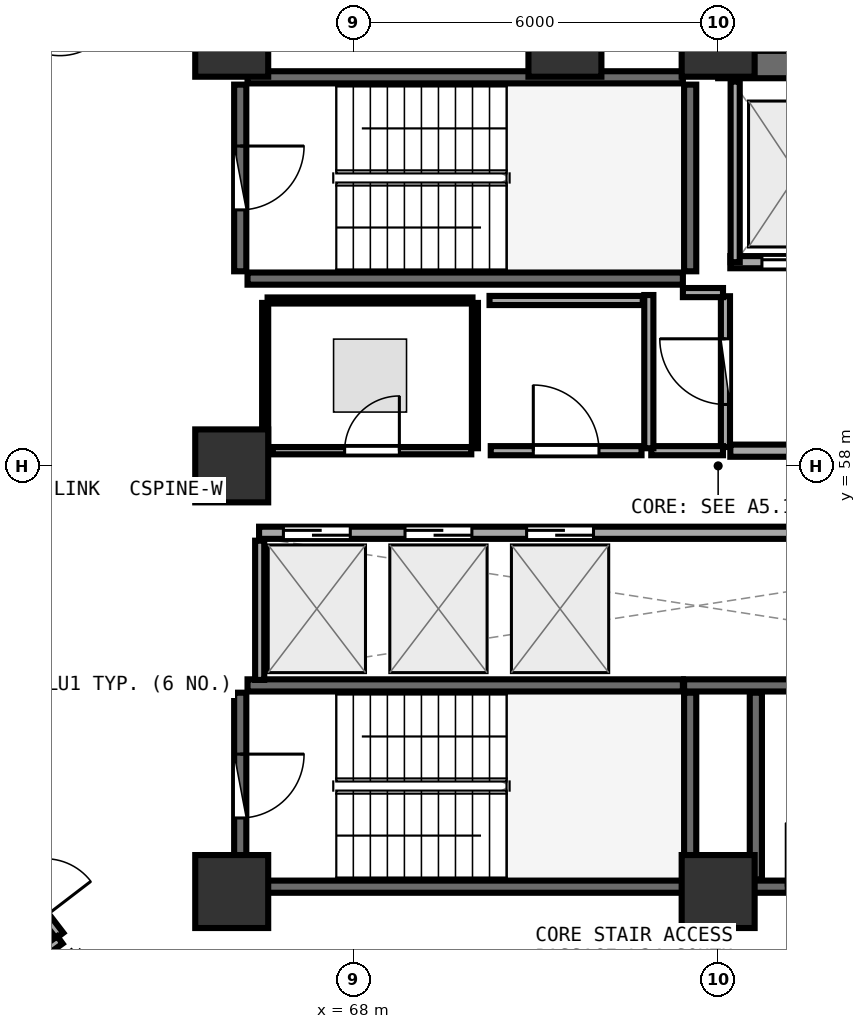
"""IFC4 building model, lengths in metres.
Left out: names, types, materials, properties, quantities, classifications, styles, units other than length and angle.
Written with IfcOpenShell. Run it as: python <this file> out.ifc"""

import sys

from ifc_helpers import new_model, si_unit, direction, frame, frame_2d, origin, origin_2d, place, context, subcontext, project, spatial, rectangle, extrude, element, fill, save


model = new_model("IFC4")
c1 = context("Model", 3, precision=1e-05, world=origin(), true_north=direction((0.0, 1.0)))
c2 = subcontext(c1, "Body", "Model", "MODEL_VIEW")
j1 = project(units=[si_unit("LENGTHUNIT", "METRE"), si_unit("PLANEANGLEUNIT", "RADIAN")], contexts=[c1])
p1 = place(None, origin())
s1 = spatial("IfcSite", under=j1, at=p1, CompositionType="ELEMENT")
p2 = place(p1, origin())
s2 = spatial("IfcBuilding", under=s1, at=p2, CompositionType="ELEMENT")
p3 = place(p2, frame((0.0, 0.0, 135.6)))
s3 = spatial("IfcBuildingStorey", under=s2, at=p3, CompositionType="ELEMENT", Elevation=135.6)
for number, where, z_axis, x_axis in (
    (1, (66.0, 51.0, 0.0), (0.0, 0.0, 1.0), (1.0, 0.0, 0.0)),
    (2, (74.0, 51.0, 0.0), (0.0, 0.0, 1.0), (1.0, 0.0, 0.0)),
    (3, (74.0, 65.0, 0.0), (0.0, 0.0, 1.0), (1.0, 0.0, 0.0)),
    (4, (71.48, 65.0, 0.0), (0.0, 0.0, 1.0), (1.0, 0.0, 0.0)),
    (5, (66.0, 65.0, 0.0), (0.0, 0.0, 1.0), (1.0, 0.0, 0.0)),
    (6, (66.0, 58.0, 0.0), (0.0, 0.0, 1.0), (1.0, 0.0, 0.0)),
):
    element("IfcColumn", number, at=place(p3, frame(where, z_axis=z_axis, x_axis=x_axis)), inside=s3, PredefinedType="PILASTER", context=c2, shape_type="SweptSolid", body=[
        extrude(rectangle(XDim=1.2, YDim=1.2, at=origin_2d()), origin(), (0.0, 0.0, 1.0), 3.75),
    ])
p4 = place(p3, frame((66.26, 61.08, 0.0), z_axis=(0.0, 0.0, 1.0), x_axis=(1.0, 0.0, 0.0)))
e7 = element("IfcWall", 7, at=p4, inside=s3, PredefinedType="SHEAR", context=c2, shape_type="SweptSolid", body=[
    extrude(rectangle(XDim=7.16, YDim=0.2, at=frame_2d((3.58, 0.0))), origin(), (0.0, 0.0, 1.0), 3.49),
])
p5 = place(p3, frame((73.54, 61.2, 0.0), z_axis=(0.0, 0.0, 1.0), x_axis=(0.0, 1.0, 0.0)))
e8 = element("IfcWall", 8, at=p5, inside=s3, PredefinedType="SHEAR", context=c2, shape_type="SweptSolid", body=[
    extrude(rectangle(XDim=3.07, YDim=0.2, at=frame_2d((1.535, 0.0))), origin(), (0.0, 0.0, 1.0), 3.49),
])
p6 = place(p3, frame((73.42, 64.39, 0.0), z_axis=(0.0, 0.0, 1.0), x_axis=(-1.0, 0.0, 0.0)))
e9 = element("IfcWall", 9, at=p6, inside=s3, PredefinedType="SHEAR", context=c2, shape_type="SweptSolid", body=[
    extrude(rectangle(XDim=7.16, YDim=0.2, at=frame_2d((3.58, 0.0))), origin(), (0.0, 0.0, 1.0), 3.49),
])
p7 = place(p3, frame((66.14, 64.27, 0.0), z_axis=(0.0, 0.0, 1.0), x_axis=(0.0, -1.0, 0.0)))
e10 = element("IfcWall", 10, at=p7, inside=s3, PredefinedType="SHEAR", context=c2, shape_type="SweptSolid", body=[
    extrude(rectangle(XDim=3.07, YDim=0.2, at=frame_2d((1.535, 0.0))), origin(), (0.0, 0.0, 1.0), 3.49),
])
p8 = place(p7, frame((1.01, 0.0, 0.0)))
e11 = element("IfcOpeningElement", 11, at=p8, cuts=e10, PredefinedType="OPENING", context=c2, shape_type="SweptSolid", body=[
    extrude(rectangle(XDim=1.05, YDim=2.1, at=frame_2d((0.525, 1.05))), frame((0.0, 0.11, 0.0), z_axis=(0.0, -1.0, 0.0), x_axis=(1.0, 0.0, 0.0)), (0.0, 0.0, 1.0), 0.22),
])
p9 = place(p3, frame((74.0, 51.08, 0.0), z_axis=(0.0, 0.0, 1.0), x_axis=(1.0, 0.0, 0.0)))
e12 = element("IfcWall", 12, at=p9, inside=s3, PredefinedType="SHEAR", context=c2, shape_type="SweptSolid", body=[
    extrude(rectangle(XDim=7.9, YDim=0.2, at=frame_2d((3.95, 0.0))), origin(), (0.0, 0.0, 1.0), 3.49),
])
p10 = place(p9, frame((1.12, 0.0, 0.0)))
e13 = element("IfcOpeningElement", 13, at=p10, cuts=e12, PredefinedType="OPENING", context=c2, shape_type="SweptSolid", body=[
    extrude(rectangle(XDim=1.05, YDim=2.1, at=frame_2d((0.525, 1.05))), frame((0.0, 0.11, 0.0), z_axis=(0.0, -1.0, 0.0), x_axis=(1.0, 0.0, 0.0)), (0.0, 0.0, 1.0), 0.22),
])
p11 = place(p3, frame((81.9, 54.39, 0.0), z_axis=(0.0, 0.0, 1.0), x_axis=(-1.0, 0.0, 0.0)))
e14 = element("IfcWall", 14, at=p11, inside=s3, PredefinedType="SHEAR", context=c2, shape_type="SweptSolid", body=[
    extrude(rectangle(XDim=8.46, YDim=0.2, at=frame_2d((4.23, 0.0))), origin(), (0.0, 0.0, 1.0), 3.49),
])
p12 = place(p3, frame((74.62, 54.27, 0.0), z_axis=(0.0, 0.0, 1.0), x_axis=(0.0, -1.0, 0.0)))
e15 = element("IfcWall", 15, at=p12, inside=s3, PredefinedType="SHEAR", context=c2, shape_type="SweptSolid", body=[
    extrude(rectangle(XDim=3.07, YDim=0.2, at=frame_2d((1.535, 0.0))), origin(), (0.0, 0.0, 1.0), 3.49),
])
p13 = place(p3, frame((66.26, 51.08, 0.0), z_axis=(0.0, 0.0, 1.0), x_axis=(1.0, 0.0, 0.0)))
e16 = element("IfcWall", 16, at=p13, inside=s3, PredefinedType="SHEAR", context=c2, shape_type="SweptSolid", body=[
    extrude(rectangle(XDim=7.16, YDim=0.2, at=frame_2d((3.58, 0.0))), origin(), (0.0, 0.0, 1.0), 3.49),
])
p14 = place(p3, frame((73.54, 51.2, 0.0), z_axis=(0.0, 0.0, 1.0), x_axis=(0.0, 1.0, 0.0)))
e17 = element("IfcWall", 17, at=p14, inside=s3, PredefinedType="SHEAR", context=c2, shape_type="SweptSolid", body=[
    extrude(rectangle(XDim=3.07, YDim=0.2, at=frame_2d((1.535, 0.0))), origin(), (0.0, 0.0, 1.0), 3.49),
])
p15 = place(p3, frame((73.42, 54.39, 0.0), z_axis=(0.0, 0.0, 1.0), x_axis=(-1.0, 0.0, 0.0)))
e18 = element("IfcWall", 18, at=p15, inside=s3, PredefinedType="SHEAR", context=c2, shape_type="SweptSolid", body=[
    extrude(rectangle(XDim=7.16, YDim=0.2, at=frame_2d((3.58, 0.0))), origin(), (0.0, 0.0, 1.0), 3.49),
])
p16 = place(p3, frame((66.14, 54.27, 0.0), z_axis=(0.0, 0.0, 1.0), x_axis=(0.0, -1.0, 0.0)))
e19 = element("IfcWall", 19, at=p16, inside=s3, PredefinedType="SHEAR", context=c2, shape_type="SweptSolid", body=[
    extrude(rectangle(XDim=3.07, YDim=0.2, at=frame_2d((1.535, 0.0))), origin(), (0.0, 0.0, 1.0), 3.49),
])
p17 = place(p16, frame((1.01, 0.0, 0.0)))
e20 = element("IfcOpeningElement", 20, at=p17, cuts=e19, PredefinedType="OPENING", context=c2, shape_type="SweptSolid", body=[
    extrude(rectangle(XDim=1.05, YDim=2.1, at=frame_2d((0.525, 1.05))), frame((0.0, 0.11, 0.0), z_axis=(0.0, -1.0, 0.0), x_axis=(1.0, 0.0, 0.0)), (0.0, 0.0, 1.0), 0.22),
])
p18 = place(p3, frame((74.0, 64.6, 0.0), z_axis=(0.0, 0.0, 1.0), x_axis=(1.0, 0.0, 0.0)))
e21 = element("IfcWall", 21, at=p18, inside=s3, PredefinedType="SHEAR", context=c2, shape_type="SweptSolid", body=[
    extrude(rectangle(XDim=8.0, YDim=0.45, at=frame_2d((4.0, 0.0))), origin(), (0.0, 0.0, 1.0), 3.49),
])
p19 = place(p3, frame((74.2, 61.35, 0.0), z_axis=(0.0, 0.0, 1.0), x_axis=(1.0, 0.0, 0.0)))
e22 = element("IfcWall", 22, at=p19, inside=s3, PredefinedType="SOLIDWALL", context=c2, shape_type="SweptSolid", body=[
    extrude(rectangle(XDim=4.6, YDim=0.2, at=frame_2d((2.3, 0.0))), origin(), (0.0, 0.0, 1.0), 3.48),
])
p20 = place(p19, frame((0.52, 0.0, 0.0)))
e23 = element("IfcOpeningElement", 23, at=p20, cuts=e22, PredefinedType="OPENING", context=c2, shape_type="SweptSolid", body=[
    extrude(rectangle(XDim=1.2, YDim=2.15, at=frame_2d((0.6, 1.075))), frame((0.0, 0.11, 0.0), z_axis=(0.0, -1.0, 0.0), x_axis=(1.0, 0.0, 0.0)), (0.0, 0.0, 1.0), 0.22),
])
p21 = place(p3, frame((74.28, 61.35, 0.0), z_axis=(0.0, 0.0, 1.0), x_axis=(0.0, 1.0, 0.0)))
e24 = element("IfcWall", 24, at=p21, inside=s3, PredefinedType="PARTITIONING", context=c2, shape_type="SweptSolid", body=[
    extrude(rectangle(XDim=2.97, YDim=0.15, at=frame_2d((1.485, 0.0))), origin(), (0.0, 0.0, 1.0), 3.48),
])
p22 = place(p3, frame((74.2, 58.25, 0.0), z_axis=(0.0, 0.0, 1.0), x_axis=(1.0, 0.0, 0.0)))
e25 = element("IfcWall", 25, at=p22, inside=s3, PredefinedType="SOLIDWALL", context=c2, shape_type="SweptSolid", body=[
    extrude(rectangle(XDim=4.6, YDim=0.2, at=frame_2d((2.3, 0.0))), origin(), (0.0, 0.0, 1.0), 3.48),
])
p23 = place(p22, frame((1.8, 0.0, 0.0)))
e26 = element("IfcOpeningElement", 26, at=p23, cuts=e25, PredefinedType="OPENING", context=c2, shape_type="SweptSolid", body=[
    extrude(rectangle(XDim=1.1, YDim=2.1, at=frame_2d((0.55, 1.05))), frame((0.0, 0.11, 0.0), z_axis=(0.0, -1.0, 0.0), x_axis=(1.0, 0.0, 0.0)), (0.0, 0.0, 1.0), 0.22),
])
p24 = place(p3, frame((66.45, 56.9, 0.0), z_axis=(0.0, 0.0, 1.0), x_axis=(1.0, 0.0, 0.0)))
e27 = element("IfcWall", 27, at=p24, inside=s3, PredefinedType="SOLIDWALL", context=c2, shape_type="SweptSolid", body=[
    extrude(rectangle(XDim=14.4, YDim=0.2, at=frame_2d((7.2, 0.0))), origin(), (0.0, 0.0, 1.0), 3.48),
])
p25 = place(p24, frame((0.4, 0.0, 0.0)))
e28 = element("IfcOpeningElement", 28, at=p25, cuts=e27, PredefinedType="OPENING", context=c2, shape_type="SweptSolid", body=[
    extrude(rectangle(XDim=1.1, YDim=2.1, at=frame_2d((0.55, 1.05))), frame((0.0, 0.11, 0.0), z_axis=(0.0, -1.0, 0.0), x_axis=(1.0, 0.0, 0.0)), (0.0, 0.0, 1.0), 0.22),
])
p26 = place(p24, frame((2.4, 0.0, 0.0)))
e29 = element("IfcOpeningElement", 29, at=p26, cuts=e27, PredefinedType="OPENING", context=c2, shape_type="SweptSolid", body=[
    extrude(rectangle(XDim=1.1, YDim=2.1, at=frame_2d((0.55, 1.05))), frame((0.0, 0.11, 0.0), z_axis=(0.0, -1.0, 0.0), x_axis=(1.0, 0.0, 0.0)), (0.0, 0.0, 1.0), 0.22),
])
p27 = place(p24, frame((4.4, 0.0, 0.0)))
e30 = element("IfcOpeningElement", 30, at=p27, cuts=e27, PredefinedType="OPENING", context=c2, shape_type="SweptSolid", body=[
    extrude(rectangle(XDim=1.1, YDim=2.1, at=frame_2d((0.55, 1.05))), frame((0.0, 0.11, 0.0), z_axis=(0.0, -1.0, 0.0), x_axis=(1.0, 0.0, 0.0)), (0.0, 0.0, 1.0), 0.22),
])
p28 = place(p3, frame((66.46, 54.48, 0.0), z_axis=(0.0, 0.0, 1.0), x_axis=(0.0, 1.0, 0.0)))
e31 = element("IfcWall", 31, at=p28, inside=s3, PredefinedType="PARTITIONING", context=c2, shape_type="SweptSolid", body=[
    extrude(rectangle(XDim=2.29, YDim=0.15, at=frame_2d((1.145, 0.0))), origin(), (0.0, 0.0, 1.0), 3.48),
])
p29 = place(p3, frame((74.12, 58.31, 0.0), z_axis=(0.0, 0.0, 1.0), x_axis=(0.0, 1.0, 0.0)))
e32 = element("IfcWall", 32, at=p29, inside=s3, PredefinedType="PARTITIONING", context=c2, shape_type="SweptSolid", body=[
    extrude(rectangle(XDim=2.48, YDim=0.15, at=frame_2d((1.24, 0.0))), origin(), (0.0, 0.0, 1.0), 3.48),
])
p30 = place(p29, frame((0.7, 0.0, 0.0)))
e33 = element("IfcOpeningElement", 33, at=p30, cuts=e32, PredefinedType="OPENING", context=c2, shape_type="SweptSolid", body=[
    extrude(rectangle(XDim=1.08, YDim=2.1, at=frame_2d((0.54, 1.05))), frame((0.0, 0.085, 0.0), z_axis=(0.0, -1.0, 0.0), x_axis=(1.0, 0.0, 0.0)), (0.0, 0.0, 1.0), 0.17),
])
p31 = place(p3, frame((66.675, 58.25, 0.0), z_axis=(0.0, 0.0, 1.0), x_axis=(1.0, 0.0, 0.0)))
e34 = element("IfcWall", 34, at=p31, inside=s3, PredefinedType="PARTITIONING", context=c2, shape_type="SweptSolid", body=[
    extrude(rectangle(XDim=3.265, YDim=0.12, at=frame_2d((1.632, 0.0))), origin(), (0.0, 0.0, 1.0), 3.48),
])
p32 = place(p31, frame((1.182, 0.0, 0.0)))
e35 = element("IfcOpeningElement", 35, at=p32, cuts=e34, PredefinedType="OPENING", context=c2, shape_type="SweptSolid", body=[
    extrude(rectangle(XDim=0.9, YDim=2.08, at=frame_2d((0.45, 1.04))), frame((0.0, 0.07, 0.0), z_axis=(0.0, -1.0, 0.0), x_axis=(1.0, 0.0, 0.0)), (0.0, 0.0, 1.0), 0.14),
])
p33 = place(p3, frame((70.26, 58.25, 0.0), z_axis=(0.0, 0.0, 1.0), x_axis=(1.0, 0.0, 0.0)))
e36 = element("IfcWall", 36, at=p33, inside=s3, PredefinedType="PARTITIONING", context=c2, shape_type="SweptSolid", body=[
    extrude(rectangle(XDim=2.48, YDim=0.15, at=frame_2d((1.24, 0.0))), origin(), (0.0, 0.0, 1.0), 3.48),
])
p34 = place(p33, frame((0.7, 0.0, 0.0)))
e37 = element("IfcOpeningElement", 37, at=p34, cuts=e36, PredefinedType="OPENING", context=c2, shape_type="SweptSolid", body=[
    extrude(rectangle(XDim=1.08, YDim=2.1, at=frame_2d((0.54, 1.05))), frame((0.0, 0.085, 0.0), z_axis=(0.0, -1.0, 0.0), x_axis=(1.0, 0.0, 0.0)), (0.0, 0.0, 1.0), 0.17),
])
p35 = place(p3, frame((63.426, 66.006, 0.0), z_axis=(0.0, 0.0, 1.0), x_axis=(-0.63192798372, -0.775027111391, 0.0)))
e38 = element("IfcWall", 38, at=p35, inside=s3, PredefinedType="PARTITIONING", context=c2, shape_type="SweptSolid", body=[
    extrude(rectangle(XDim=1.747, YDim=0.15, at=frame_2d((0.874, 0.0))), origin(), (0.0, 0.0, 1.0), 2.975),
])
p36 = place(p35, frame((0.399, 0.0, 0.0)))
e39 = element("IfcOpeningElement", 39, at=p36, cuts=e38, PredefinedType="OPENING", context=c2, shape_type="SweptSolid", body=[
    extrude(rectangle(XDim=0.95, YDim=2.08, at=frame_2d((0.475, 1.04))), frame((0.0, 0.085, 0.0), z_axis=(0.0, -1.0, 0.0), x_axis=(1.0, 0.0, 0.0)), (0.0, 0.0, 1.0), 0.17),
])
p37 = place(p3, frame((62.111, 51.658, 0.0), z_axis=(0.0, 0.0, 1.0), x_axis=(0.608307977949, -0.793701079729, 0.0)))
e40 = element("IfcWall", 40, at=p37, inside=s3, PredefinedType="PARTITIONING", context=c2, shape_type="SweptSolid", body=[
    extrude(rectangle(XDim=1.742, YDim=0.15, at=frame_2d((0.871, 0.0))), origin(), (0.0, 0.0, 1.0), 2.975),
])
p38 = place(p37, frame((0.396, 0.0, 0.0)))
e41 = element("IfcOpeningElement", 41, at=p38, cuts=e40, PredefinedType="OPENING", context=c2, shape_type="SweptSolid", body=[
    extrude(rectangle(XDim=0.95, YDim=2.08, at=frame_2d((0.475, 1.04))), frame((0.0, 0.085, 0.0), z_axis=(0.0, -1.0, 0.0), x_axis=(1.0, 0.0, 0.0)), (0.0, 0.0, 1.0), 0.17),
])
p39 = place(p3, frame((72.9, 58.25, 0.0), z_axis=(0.0, 0.0, 1.0), x_axis=(1.0, 0.0, 0.0)))
e42 = element("IfcWall", 42, at=p39, inside=s3, PredefinedType="PARTITIONING", context=c2, shape_type="SweptSolid", body=[
    extrude(rectangle(XDim=1.18, YDim=0.15, at=frame_2d((0.59, 0.0))), origin(), (0.0, 0.0, 1.0), 3.48),
])
p40 = place(p3, frame((74.08, 60.85, 0.0), z_axis=(0.0, 0.0, 1.0), x_axis=(-1.0, 0.0, 0.0)))
e43 = element("IfcWall", 43, at=p40, inside=s3, PredefinedType="PARTITIONING", context=c2, shape_type="SweptSolid", body=[
    extrude(rectangle(XDim=0.66, YDim=0.15, at=frame_2d((0.33, 0.0))), origin(), (0.0, 0.0, 1.0), 3.48),
])
p41 = place(p3, frame((72.86, 60.81, 0.0), z_axis=(0.0, 0.0, 1.0), x_axis=(0.0, -1.0, 0.0)))
e44 = element("IfcWall", 44, at=p41, inside=s3, PredefinedType="PARTITIONING", context=c2, shape_type="SweptSolid", body=[
    extrude(rectangle(XDim=2.52, YDim=0.15, at=frame_2d((1.26, 0.0))), origin(), (0.0, 0.0, 1.0), 3.48),
])
p42 = place(p3, frame((70.0, 58.29, 0.0), z_axis=(0.0, 0.0, 1.0), x_axis=(0.0, 1.0, 0.0)))
e45 = element("IfcWall", 45, at=p42, inside=s3, PredefinedType="PARTITIONING", context=c2, shape_type="SweptSolid", body=[
    extrude(rectangle(XDim=2.39, YDim=0.1, at=frame_2d((1.195, 0.0))), origin(), (0.0, 0.0, 1.0), 3.48),
])
p43 = place(p3, frame((69.96, 60.72, 0.0), z_axis=(0.0, 0.0, 1.0), x_axis=(-1.0, 0.0, 0.0)))
e46 = element("IfcWall", 46, at=p43, inside=s3, PredefinedType="PARTITIONING", context=c2, shape_type="SweptSolid", body=[
    extrude(rectangle(XDim=3.37, YDim=0.1, at=frame_2d((1.685, 0.0))), origin(), (0.0, 0.0, 1.0), 3.48),
])
p44 = place(p3, frame((66.55, 60.68, 0.0), z_axis=(0.0, 0.0, 1.0), x_axis=(0.0, -1.0, 0.0)))
e47 = element("IfcWall", 47, at=p44, inside=s3, PredefinedType="PARTITIONING", context=c2, shape_type="SweptSolid", body=[
    extrude(rectangle(XDim=2.383, YDim=0.1, at=frame_2d((1.191, 0.0))), origin(), (0.0, 0.0, 1.0), 3.48),
])
p45 = place(p3, frame((72.76, 60.72, 0.0), z_axis=(0.0, 0.0, 1.0), x_axis=(-1.0, 0.0, 0.0)))
e48 = element("IfcWall", 48, at=p45, inside=s3, PredefinedType="PARTITIONING", context=c2, shape_type="SweptSolid", body=[
    extrude(rectangle(XDim=2.52, YDim=0.15, at=frame_2d((1.26, 0.0))), origin(), (0.0, 0.0, 1.0), 3.48),
])
p46 = place(p3, frame((63.175, 50.205, 0.0), z_axis=(0.0, 0.0, 1.0), x_axis=(-0.810227225477, -0.586115895618, 0.0)))
e49 = element("IfcWall", 49, at=p46, inside=s3, PredefinedType="PARTITIONING", context=c2, shape_type="SweptSolid", body=[
    extrude(rectangle(XDim=7.011, YDim=0.15, at=frame_2d((3.506, 0.0))), origin(), (0.0, 0.0, 1.0), 3.175),
])
p47 = place(p8, origin())
e50 = element("IfcDoor", 50, at=p47, inside=s3, OperationType="SINGLE_SWING_LEFT", PredefinedType="DOOR", context=c2, shape_type="SweptSolid", body=[
    extrude(rectangle(XDim=1.05, YDim=2.1, at=frame_2d((0.525, 1.05))), frame((0.0, 0.025, 0.0), z_axis=(0.0, -1.0, 0.0), x_axis=(1.0, 0.0, 0.0)), (0.0, 0.0, 1.0), 0.05),
])
fill(e11, e50)
p48 = place(p10, origin())
e51 = element("IfcDoor", 51, at=p48, inside=s3, OperationType="SINGLE_SWING_LEFT", PredefinedType="DOOR", context=c2, shape_type="SweptSolid", body=[
    extrude(rectangle(XDim=1.05, YDim=2.1, at=frame_2d((0.525, 1.05))), frame((0.0, 0.025, 0.0), z_axis=(0.0, -1.0, 0.0), x_axis=(1.0, 0.0, 0.0)), (0.0, 0.0, 1.0), 0.05),
])
fill(e13, e51)
p49 = place(p17, origin())
e52 = element("IfcDoor", 52, at=p49, inside=s3, OperationType="SINGLE_SWING_LEFT", PredefinedType="DOOR", context=c2, shape_type="SweptSolid", body=[
    extrude(rectangle(XDim=1.05, YDim=2.1, at=frame_2d((0.525, 1.05))), frame((0.0, 0.025, 0.0), z_axis=(0.0, -1.0, 0.0), x_axis=(1.0, 0.0, 0.0)), (0.0, 0.0, 1.0), 0.05),
])
fill(e20, e52)
p50 = place(p20, origin())
e53 = element("IfcDoor", 53, at=p50, inside=s3, OperationType="DOUBLE_DOOR_SLIDING", PredefinedType="DOOR", context=c2, shape_type="SweptSolid", body=[
    extrude(rectangle(XDim=1.2, YDim=2.15, at=frame_2d((0.6, 1.075))), frame((0.0, 0.025, 0.0), z_axis=(0.0, -1.0, 0.0), x_axis=(1.0, 0.0, 0.0)), (0.0, 0.0, 1.0), 0.05),
])
fill(e23, e53)
p51 = place(p25, origin())
e54 = element("IfcDoor", 54, at=p51, inside=s3, OperationType="DOUBLE_DOOR_SLIDING", PredefinedType="DOOR", context=c2, shape_type="SweptSolid", body=[
    extrude(rectangle(XDim=1.1, YDim=2.1, at=frame_2d((0.55, 1.05))), frame((0.0, 0.025, 0.0), z_axis=(0.0, -1.0, 0.0), x_axis=(1.0, 0.0, 0.0)), (0.0, 0.0, 1.0), 0.05),
])
fill(e28, e54)
p52 = place(p26, origin())
e55 = element("IfcDoor", 55, at=p52, inside=s3, OperationType="DOUBLE_DOOR_SLIDING", PredefinedType="DOOR", context=c2, shape_type="SweptSolid", body=[
    extrude(rectangle(XDim=1.1, YDim=2.1, at=frame_2d((0.55, 1.05))), frame((0.0, 0.025, 0.0), z_axis=(0.0, -1.0, 0.0), x_axis=(1.0, 0.0, 0.0)), (0.0, 0.0, 1.0), 0.05),
])
fill(e29, e55)
p53 = place(p27, origin())
e56 = element("IfcDoor", 56, at=p53, inside=s3, OperationType="DOUBLE_DOOR_SLIDING", PredefinedType="DOOR", context=c2, shape_type="SweptSolid", body=[
    extrude(rectangle(XDim=1.1, YDim=2.1, at=frame_2d((0.55, 1.05))), frame((0.0, 0.025, 0.0), z_axis=(0.0, -1.0, 0.0), x_axis=(1.0, 0.0, 0.0)), (0.0, 0.0, 1.0), 0.05),
])
fill(e30, e56)
p54 = place(p30, origin())
e57 = element("IfcDoor", 57, at=p54, inside=s3, OperationType="SINGLE_SWING_RIGHT", PredefinedType="DOOR", context=c2, shape_type="SweptSolid", body=[
    extrude(rectangle(XDim=1.08, YDim=2.1, at=frame_2d((0.54, 1.05))), frame((0.0, 0.025, 0.0), z_axis=(0.0, -1.0, 0.0), x_axis=(1.0, 0.0, 0.0)), (0.0, 0.0, 1.0), 0.05),
])
fill(e33, e57)
p55 = place(p32, origin())
e58 = element("IfcDoor", 58, at=p55, inside=s3, OperationType="SINGLE_SWING_RIGHT", PredefinedType="DOOR", context=c2, shape_type="SweptSolid", body=[
    extrude(rectangle(XDim=0.9, YDim=2.08, at=frame_2d((0.45, 1.04))), frame((0.0, 0.025, 0.0), z_axis=(0.0, -1.0, 0.0), x_axis=(1.0, 0.0, 0.0)), (0.0, 0.0, 1.0), 0.05),
])
fill(e35, e58)
p56 = place(p34, origin())
e59 = element("IfcDoor", 59, at=p56, inside=s3, OperationType="SINGLE_SWING_LEFT", PredefinedType="DOOR", context=c2, shape_type="SweptSolid", body=[
    extrude(rectangle(XDim=1.08, YDim=2.1, at=frame_2d((0.54, 1.05))), frame((0.0, 0.025, 0.0), z_axis=(0.0, -1.0, 0.0), x_axis=(1.0, 0.0, 0.0)), (0.0, 0.0, 1.0), 0.05),
])
fill(e37, e59)
save(model, sys.argv[1])
